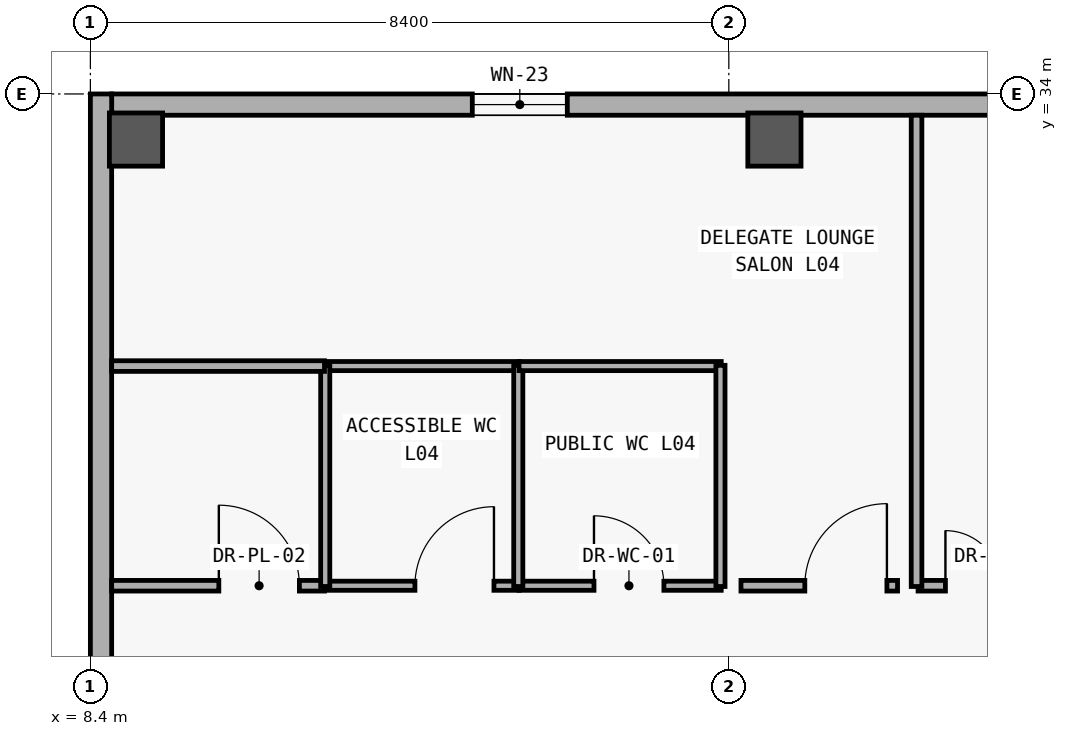
"""IFC4 building model, lengths in metres.
Left out: names, types, materials, properties, quantities, classifications, styles, units other than length and angle.
Written with IfcOpenShell. Run it as: python <this file> out.ifc"""

import sys

from ifc_helpers import new_model, si_unit, direction, frame, frame_2d, origin, origin_2d, place, context, subcontext, project, spatial, rectangle, extrude, element, fill, save


model = new_model("IFC4")
c1 = context("Model", 3, precision=1e-05, world=origin(), true_north=direction((0.0, 1.0)))
c2 = subcontext(c1, "Body", "Model", "MODEL_VIEW")
j1 = project(units=[si_unit("LENGTHUNIT", "METRE"), si_unit("PLANEANGLEUNIT", "RADIAN")], contexts=[c1])
p1 = place(None, origin())
s1 = spatial("IfcSite", under=j1, at=p1, CompositionType="ELEMENT")
p2 = place(p1, origin())
s2 = spatial("IfcBuilding", under=s1, at=p2, CompositionType="ELEMENT")
p3 = place(p2, frame((0.0, 0.0, 19.2)))
s3 = spatial("IfcBuildingStorey", under=s2, at=p3, CompositionType="ELEMENT", Elevation=19.2)
for number, where, z_axis, x_axis in (
    (1, (9.0, 33.4, 0.0), (0.0, 0.0, 1.0), (1.0, 0.0, 0.0)),
    (2, (17.4, 33.4, 0.0), (0.0, 0.0, 1.0), (1.0, 0.0, 0.0)),
):
    element("IfcColumn", number, at=place(p3, frame(where, z_axis=z_axis, x_axis=x_axis)), inside=s3, PredefinedType="COLUMN", context=c2, shape_type="SweptSolid", body=[
        extrude(rectangle(XDim=0.7, YDim=0.7, at=origin_2d()), origin(), (0.0, 0.0, 1.0), 3.6),
    ])
p4 = place(p3, frame((8.68, 33.86, 0.0), z_axis=(0.0, 0.0, 1.0), x_axis=(1.0, 0.0, 0.0)))
e3 = element("IfcWall", 3, at=p4, inside=s3, PredefinedType="SOLIDWALL", context=c2, shape_type="SweptSolid", body=[
    extrude(rectangle(XDim=83.44, YDim=0.28, at=frame_2d((41.72, 0.0))), origin(), (0.0, 0.0, 1.0), 3.32),
])
p5 = place(p4, frame((4.745, 0.0, 0.85)))
e4 = element("IfcOpeningElement", 4, at=p5, cuts=e3, PredefinedType="OPENING", context=c2, shape_type="SweptSolid", body=[
    extrude(rectangle(XDim=1.25, YDim=1.45, at=frame_2d((0.625, 0.725))), frame((0.0, 0.15, 0.0), z_axis=(0.0, -1.0, 0.0), x_axis=(1.0, 0.0, 0.0)), (0.0, 0.0, 1.0), 0.3),
])
p6 = place(p4, frame((11.846, 0.0, 0.85)))
e5 = element("IfcOpeningElement", 5, at=p6, cuts=e3, PredefinedType="OPENING", context=c2, shape_type="SweptSolid", body=[
    extrude(rectangle(XDim=1.78, YDim=1.95, at=frame_2d((0.89, 0.975))), frame((0.0, 0.15, 0.0), z_axis=(0.0, -1.0, 0.0), x_axis=(1.0, 0.0, 0.0)), (0.0, 0.0, 1.0), 0.3),
])
p7 = place(p4, frame((16.068, 0.0, 0.85)))
e6 = element("IfcOpeningElement", 6, at=p7, cuts=e3, PredefinedType="OPENING", context=c2, shape_type="SweptSolid", body=[
    extrude(rectangle(XDim=1.88, YDim=1.95, at=frame_2d((0.94, 0.975))), frame((0.0, 0.15, 0.0), z_axis=(0.0, -1.0, 0.0), x_axis=(1.0, 0.0, 0.0)), (0.0, 0.0, 1.0), 0.3),
])
p8 = place(p4, frame((20.255, 0.0, 0.85)))
e7 = element("IfcOpeningElement", 7, at=p8, cuts=e3, PredefinedType="OPENING", context=c2, shape_type="SweptSolid", body=[
    extrude(rectangle(XDim=2.05, YDim=1.95, at=frame_2d((1.025, 0.975))), frame((0.0, 0.15, 0.0), z_axis=(0.0, -1.0, 0.0), x_axis=(1.0, 0.0, 0.0)), (0.0, 0.0, 1.0), 0.3),
])
p9 = place(p4, frame((24.461, 0.0, 0.85)))
e8 = element("IfcOpeningElement", 8, at=p9, cuts=e3, PredefinedType="OPENING", context=c2, shape_type="SweptSolid", body=[
    extrude(rectangle(XDim=2.18, YDim=1.95, at=frame_2d((1.09, 0.975))), frame((0.0, 0.15, 0.0), z_axis=(0.0, -1.0, 0.0), x_axis=(1.0, 0.0, 0.0)), (0.0, 0.0, 1.0), 0.3),
])
p10 = place(p4, frame((28.633, 0.0, 0.85)))
e9 = element("IfcOpeningElement", 9, at=p10, cuts=e3, PredefinedType="OPENING", context=c2, shape_type="SweptSolid", body=[
    extrude(rectangle(XDim=2.38, YDim=1.95, at=frame_2d((1.19, 0.975))), frame((0.0, 0.15, 0.0), z_axis=(0.0, -1.0, 0.0), x_axis=(1.0, 0.0, 0.0)), (0.0, 0.0, 1.0), 0.3),
])
p11 = place(p4, frame((32.855, 0.0, 0.85)))
e10 = element("IfcOpeningElement", 10, at=p11, cuts=e3, PredefinedType="OPENING", context=c2, shape_type="SweptSolid", body=[
    extrude(rectangle(XDim=2.48, YDim=2.0, at=frame_2d((1.24, 1.0))), frame((0.0, 0.15, 0.0), z_axis=(0.0, -1.0, 0.0), x_axis=(1.0, 0.0, 0.0)), (0.0, 0.0, 1.0), 0.3),
])
p12 = place(p4, frame((37.041, 0.0, 0.85)))
e11 = element("IfcOpeningElement", 11, at=p12, cuts=e3, PredefinedType="OPENING", context=c2, shape_type="SweptSolid", body=[
    extrude(rectangle(XDim=2.65, YDim=2.0, at=frame_2d((1.325, 1.0))), frame((0.0, 0.15, 0.0), z_axis=(0.0, -1.0, 0.0), x_axis=(1.0, 0.0, 0.0)), (0.0, 0.0, 1.0), 0.3),
])
p13 = place(p4, frame((41.163, 0.0, 0.85)))
e12 = element("IfcOpeningElement", 12, at=p13, cuts=e3, PredefinedType="OPENING", context=c2, shape_type="SweptSolid", body=[
    extrude(rectangle(XDim=2.95, YDim=2.05, at=frame_2d((1.475, 1.025))), frame((0.0, 0.15, 0.0), z_axis=(0.0, -1.0, 0.0), x_axis=(1.0, 0.0, 0.0)), (0.0, 0.0, 1.0), 0.3),
])
p14 = place(p4, frame((45.21, 0.0, 0.85)))
e13 = element("IfcOpeningElement", 13, at=p14, cuts=e3, PredefinedType="OPENING", context=c2, shape_type="SweptSolid", body=[
    extrude(rectangle(XDim=3.4, YDim=2.1, at=frame_2d((1.7, 1.05))), frame((0.0, 0.15, 0.0), z_axis=(0.0, -1.0, 0.0), x_axis=(1.0, 0.0, 0.0)), (0.0, 0.0, 1.0), 0.3),
])
p15 = place(p4, frame((50.282, 0.0, 0.85)))
e14 = element("IfcOpeningElement", 14, at=p15, cuts=e3, PredefinedType="OPENING", context=c2, shape_type="SweptSolid", body=[
    extrude(rectangle(XDim=1.8, YDim=1.8, at=frame_2d((0.9, 0.9))), frame((0.0, 0.15, 0.0), z_axis=(0.0, -1.0, 0.0), x_axis=(1.0, 0.0, 0.0)), (0.0, 0.0, 1.0), 0.3),
])
p16 = place(p4, frame((54.404, 0.0, 0.85)))
e15 = element("IfcOpeningElement", 15, at=p16, cuts=e3, PredefinedType="OPENING", context=c2, shape_type="SweptSolid", body=[
    extrude(rectangle(XDim=2.1, YDim=1.8, at=frame_2d((1.05, 0.9))), frame((0.0, 0.15, 0.0), z_axis=(0.0, -1.0, 0.0), x_axis=(1.0, 0.0, 0.0)), (0.0, 0.0, 1.0), 0.3),
])
p17 = place(p4, frame((58.525, 0.0, 0.85)))
e16 = element("IfcOpeningElement", 16, at=p17, cuts=e3, PredefinedType="OPENING", context=c2, shape_type="SweptSolid", body=[
    extrude(rectangle(XDim=2.4, YDim=1.8, at=frame_2d((1.2, 0.9))), frame((0.0, 0.15, 0.0), z_axis=(0.0, -1.0, 0.0), x_axis=(1.0, 0.0, 0.0)), (0.0, 0.0, 1.0), 0.3),
])
p18 = place(p4, frame((62.647, 0.0, 0.85)))
e17 = element("IfcOpeningElement", 17, at=p18, cuts=e3, PredefinedType="OPENING", context=c2, shape_type="SweptSolid", body=[
    extrude(rectangle(XDim=2.7, YDim=1.85, at=frame_2d((1.35, 0.925))), frame((0.0, 0.15, 0.0), z_axis=(0.0, -1.0, 0.0), x_axis=(1.0, 0.0, 0.0)), (0.0, 0.0, 1.0), 0.3),
])
p19 = place(p4, frame((66.769, 0.0, 0.85)))
e18 = element("IfcOpeningElement", 18, at=p19, cuts=e3, PredefinedType="OPENING", context=c2, shape_type="SweptSolid", body=[
    extrude(rectangle(XDim=3.0, YDim=1.9, at=frame_2d((1.5, 0.95))), frame((0.0, 0.15, 0.0), z_axis=(0.0, -1.0, 0.0), x_axis=(1.0, 0.0, 0.0)), (0.0, 0.0, 1.0), 0.3),
])
p20 = place(p4, frame((71.791, 0.0, 0.85)))
e19 = element("IfcOpeningElement", 19, at=p20, cuts=e3, PredefinedType="OPENING", context=c2, shape_type="SweptSolid", body=[
    extrude(rectangle(XDim=1.5, YDim=1.75, at=frame_2d((0.75, 0.875))), frame((0.0, 0.15, 0.0), z_axis=(0.0, -1.0, 0.0), x_axis=(1.0, 0.0, 0.0)), (0.0, 0.0, 1.0), 0.3),
])
p21 = place(p4, frame((75.987, 0.0, 0.85)))
e20 = element("IfcOpeningElement", 20, at=p21, cuts=e3, PredefinedType="OPENING", context=c2, shape_type="SweptSolid", body=[
    extrude(rectangle(XDim=1.65, YDim=1.75, at=frame_2d((0.825, 0.875))), frame((0.0, 0.15, 0.0), z_axis=(0.0, -1.0, 0.0), x_axis=(1.0, 0.0, 0.0)), (0.0, 0.0, 1.0), 0.3),
])
p22 = place(p4, frame((80.109, 0.0, 0.85)))
e21 = element("IfcOpeningElement", 21, at=p22, cuts=e3, PredefinedType="OPENING", context=c2, shape_type="SweptSolid", body=[
    extrude(rectangle(XDim=1.95, YDim=1.75, at=frame_2d((0.975, 0.875))), frame((0.0, 0.15, 0.0), z_axis=(0.0, -1.0, 0.0), x_axis=(1.0, 0.0, 0.0)), (0.0, 0.0, 1.0), 0.3),
])
p23 = place(p3, frame((8.54, 6.0, 0.0), z_axis=(0.0, 0.0, 1.0), x_axis=(0.0, 1.0, 0.0)))
e22 = element("IfcWall", 22, at=p23, inside=s3, PredefinedType="SOLIDWALL", context=c2, shape_type="SweptSolid", body=[
    extrude(rectangle(XDim=28.0, YDim=0.28, at=frame_2d((14.0, 0.0))), origin(), (0.0, 0.0, 1.0), 3.32),
])
p24 = place(p23, frame((4.5, 0.0, 0.95)))
e23 = element("IfcOpeningElement", 23, at=p24, cuts=e22, PredefinedType="OPENING", context=c2, shape_type="SweptSolid", body=[
    extrude(rectangle(XDim=1.6, YDim=1.6, at=frame_2d((0.8, 0.8))), frame((0.0, 0.15, 0.0), z_axis=(0.0, -1.0, 0.0), x_axis=(1.0, 0.0, 0.0)), (0.0, 0.0, 1.0), 0.3),
])
p25 = place(p3, frame((11.48, 27.53, 0.0), z_axis=(0.0, 0.0, 1.0), x_axis=(1.0, 0.0, 0.0)))
e24 = element("IfcWall", 24, at=p25, inside=s3, PredefinedType="PARTITIONING", context=c2, shape_type="SweptSolid", body=[
    extrude(rectangle(XDim=2.56, YDim=0.12, at=frame_2d((1.28, 0.0))), origin(), (0.0, 0.0, 1.0), 2.48),
])
p26 = place(p25, frame((1.19, 0.0, 0.0)))
e25 = element("IfcOpeningElement", 25, at=p26, cuts=e24, PredefinedType="OPENING", context=c2, shape_type="SweptSolid", body=[
    extrude(rectangle(XDim=1.04, YDim=2.15, at=frame_2d((0.52, 1.075))), frame((0.0, 0.07, 0.0), z_axis=(0.0, -1.0, 0.0), x_axis=(1.0, 0.0, 0.0)), (0.0, 0.0, 1.0), 0.14),
])
p27 = place(p3, frame((14.04, 27.53, 0.0), z_axis=(0.0, 0.0, 1.0), x_axis=(1.0, 0.0, 0.0)))
e26 = element("IfcWall", 26, at=p27, inside=s3, PredefinedType="PARTITIONING", context=c2, shape_type="SweptSolid", body=[
    extrude(rectangle(XDim=2.66, YDim=0.12, at=frame_2d((1.33, 0.0))), origin(), (0.0, 0.0, 1.0), 2.48),
])
p28 = place(p27, frame((0.986, 0.0, 0.0)))
e27 = element("IfcOpeningElement", 27, at=p28, cuts=e26, PredefinedType="OPENING", context=c2, shape_type="SweptSolid", body=[
    extrude(rectangle(XDim=0.92, YDim=2.15, at=frame_2d((0.46, 1.075))), frame((0.0, 0.07, 0.0), z_axis=(0.0, -1.0, 0.0), x_axis=(1.0, 0.0, 0.0)), (0.0, 0.0, 1.0), 0.14),
])
p29 = place(p3, frame((8.68, 27.53, 0.0), z_axis=(0.0, 0.0, 1.0), x_axis=(1.0, 0.0, 0.0)))
e28 = element("IfcWall", 28, at=p29, inside=s3, PredefinedType="PARTITIONING", context=c2, shape_type="SweptSolid", body=[
    extrude(rectangle(XDim=2.8, YDim=0.14, at=frame_2d((1.4, 0.0))), origin(), (0.0, 0.0, 1.0), 2.48),
])
p30 = place(p29, frame((1.41, 0.0, 0.0)))
e29 = element("IfcOpeningElement", 29, at=p30, cuts=e28, PredefinedType="OPENING", context=c2, shape_type="SweptSolid", body=[
    extrude(rectangle(XDim=1.06, YDim=2.2, at=frame_2d((0.53, 1.1))), frame((0.0, 0.08, 0.0), z_axis=(0.0, -1.0, 0.0), x_axis=(1.0, 0.0, 0.0)), (0.0, 0.0, 1.0), 0.16),
])
p31 = place(p3, frame((16.96, 27.53, 0.0), z_axis=(0.0, 0.0, 1.0), x_axis=(1.0, 0.0, 0.0)))
e30 = element("IfcWall", 30, at=p31, inside=s3, PredefinedType="PARTITIONING", context=c2, shape_type="SweptSolid", body=[
    extrude(rectangle(XDim=2.06, YDim=0.14, at=frame_2d((1.03, 0.0))), origin(), (0.0, 0.0, 1.0), 2.48),
])
p32 = place(p31, frame((0.84, 0.0, 0.0)))
e31 = element("IfcOpeningElement", 31, at=p32, cuts=e30, PredefinedType="OPENING", context=c2, shape_type="SweptSolid", body=[
    extrude(rectangle(XDim=1.08, YDim=2.25, at=frame_2d((0.54, 1.125))), frame((0.0, 0.08, 0.0), z_axis=(0.0, -1.0, 0.0), x_axis=(1.0, 0.0, 0.0)), (0.0, 0.0, 1.0), 0.16),
])
p33 = place(p3, frame((19.29, 27.53, 0.0), z_axis=(0.0, 0.0, 1.0), x_axis=(1.0, 0.0, 0.0)))
e32 = element("IfcWall", 32, at=p33, inside=s3, PredefinedType="PARTITIONING", context=c2, shape_type="SweptSolid", body=[
    extrude(rectangle(XDim=2.755, YDim=0.14, at=frame_2d((1.377, 0.0))), origin(), (0.0, 0.0, 1.0), 2.48),
])
p34 = place(p33, frame((0.36, 0.0, 0.0)))
e33 = element("IfcOpeningElement", 33, at=p34, cuts=e32, PredefinedType="OPENING", context=c2, shape_type="SweptSolid", body=[
    extrude(rectangle(XDim=1.45, YDim=2.3, at=frame_2d((0.725, 1.15))), frame((0.0, 0.08, 0.0), z_axis=(0.0, -1.0, 0.0), x_axis=(1.0, 0.0, 0.0)), (0.0, 0.0, 1.0), 0.16),
])
p35 = place(p3, frame((11.48, 30.42, 0.0), z_axis=(0.0, 0.0, 1.0), x_axis=(1.0, 0.0, 0.0)))
e34 = element("IfcWall", 34, at=p35, inside=s3, PredefinedType="PARTITIONING", context=c2, shape_type="SweptSolid", body=[
    extrude(rectangle(XDim=2.56, YDim=0.12, at=frame_2d((1.28, 0.0))), origin(), (0.0, 0.0, 1.0), 2.48),
])
for number, where, z_axis, x_axis in (
    (35, (11.49, 27.52, 0.0), (0.0, 0.0, 1.0), (0.0, 1.0, 0.0)),
    (36, (14.03, 27.52, 0.0), (0.0, 0.0, 1.0), (0.0, 1.0, 0.0)),
):
    element("IfcWall", number, at=place(p3, frame(where, z_axis=z_axis, x_axis=x_axis)), inside=s3, PredefinedType="PARTITIONING", context=c2, shape_type="SweptSolid", body=[
        extrude(rectangle(XDim=2.91, YDim=0.12, at=frame_2d((1.455, 0.0))), origin(), (0.0, 0.0, 1.0), 2.48),
    ])
p36 = place(p3, frame((14.04, 30.42, 0.0), z_axis=(0.0, 0.0, 1.0), x_axis=(1.0, 0.0, 0.0)))
e37 = element("IfcWall", 37, at=p36, inside=s3, PredefinedType="PARTITIONING", context=c2, shape_type="SweptSolid", body=[
    extrude(rectangle(XDim=2.66, YDim=0.12, at=frame_2d((1.33, 0.0))), origin(), (0.0, 0.0, 1.0), 2.48),
])
p37 = place(p3, frame((16.69, 27.52, 0.0), z_axis=(0.0, 0.0, 1.0), x_axis=(0.0, 1.0, 0.0)))
e38 = element("IfcWall", 38, at=p37, inside=s3, PredefinedType="PARTITIONING", context=c2, shape_type="SweptSolid", body=[
    extrude(rectangle(XDim=2.91, YDim=0.12, at=frame_2d((1.455, 0.0))), origin(), (0.0, 0.0, 1.0), 2.48),
])
p38 = place(p3, frame((8.68, 30.42, 0.0), z_axis=(0.0, 0.0, 1.0), x_axis=(1.0, 0.0, 0.0)))
e39 = element("IfcWall", 39, at=p38, inside=s3, PredefinedType="PARTITIONING", context=c2, shape_type="SweptSolid", body=[
    extrude(rectangle(XDim=2.8, YDim=0.14, at=frame_2d((1.4, 0.0))), origin(), (0.0, 0.0, 1.0), 2.48),
])
p39 = place(p3, frame((19.27, 27.52, 0.0), z_axis=(0.0, 0.0, 1.0), x_axis=(0.0, 1.0, 0.0)))
e40 = element("IfcWall", 40, at=p39, inside=s3, PredefinedType="PARTITIONING", context=c2, shape_type="SweptSolid", body=[
    extrude(rectangle(XDim=6.2, YDim=0.14, at=frame_2d((3.1, 0.0))), origin(), (0.0, 0.0, 1.0), 2.48),
])
p40 = place(p5, origin())
e41 = element("IfcWindow", 41, at=p40, inside=s3, PartitioningType="SINGLE_PANEL", PredefinedType="WINDOW", context=c2, shape_type="SweptSolid", body=[
    extrude(rectangle(XDim=1.25, YDim=1.45, at=frame_2d((0.625, 0.725))), frame((0.0, 0.03, 0.0), z_axis=(0.0, -1.0, 0.0), x_axis=(1.0, 0.0, 0.0)), (0.0, 0.0, 1.0), 0.06),
])
fill(e4, e41)
p41 = place(p26, origin())
e42 = element("IfcDoor", 42, at=p41, inside=s3, OperationType="SINGLE_SWING_RIGHT", PredefinedType="DOOR", context=c2, shape_type="SweptSolid", body=[
    extrude(rectangle(XDim=1.04, YDim=2.15, at=frame_2d((0.52, 1.075))), frame((0.0, 0.025, 0.0), z_axis=(0.0, -1.0, 0.0), x_axis=(1.0, 0.0, 0.0)), (0.0, 0.0, 1.0), 0.05),
])
fill(e25, e42)
p42 = place(p28, origin())
e43 = element("IfcDoor", 43, at=p42, inside=s3, OperationType="SINGLE_SWING_LEFT", PredefinedType="DOOR", context=c2, shape_type="SweptSolid", body=[
    extrude(rectangle(XDim=0.92, YDim=2.15, at=frame_2d((0.46, 1.075))), frame((0.0, 0.025, 0.0), z_axis=(0.0, -1.0, 0.0), x_axis=(1.0, 0.0, 0.0)), (0.0, 0.0, 1.0), 0.05),
])
fill(e27, e43)
p43 = place(p30, origin())
e44 = element("IfcDoor", 44, at=p43, inside=s3, OperationType="SINGLE_SWING_LEFT", PredefinedType="DOOR", context=c2, shape_type="SweptSolid", body=[
    extrude(rectangle(XDim=1.06, YDim=2.2, at=frame_2d((0.53, 1.1))), frame((0.0, 0.025, 0.0), z_axis=(0.0, -1.0, 0.0), x_axis=(1.0, 0.0, 0.0)), (0.0, 0.0, 1.0), 0.05),
])
fill(e29, e44)
p44 = place(p32, origin())
e45 = element("IfcDoor", 45, at=p44, inside=s3, OperationType="SINGLE_SWING_RIGHT", PredefinedType="DOOR", context=c2, shape_type="SweptSolid", body=[
    extrude(rectangle(XDim=1.08, YDim=2.25, at=frame_2d((0.54, 1.125))), frame((0.0, 0.025, 0.0), z_axis=(0.0, -1.0, 0.0), x_axis=(1.0, 0.0, 0.0)), (0.0, 0.0, 1.0), 0.05),
])
fill(e31, e45)
p45 = place(p34, origin())
e46 = element("IfcDoor", 46, at=p45, inside=s3, OperationType="DOUBLE_DOOR_SINGLE_SWING", PredefinedType="DOOR", context=c2, shape_type="SweptSolid", body=[
    extrude(rectangle(XDim=1.45, YDim=2.3, at=frame_2d((0.725, 1.15))), frame((0.0, 0.025, 0.0), z_axis=(0.0, -1.0, 0.0), x_axis=(1.0, 0.0, 0.0)), (0.0, 0.0, 1.0), 0.05),
])
fill(e33, e46)
save(model, sys.argv[1])
